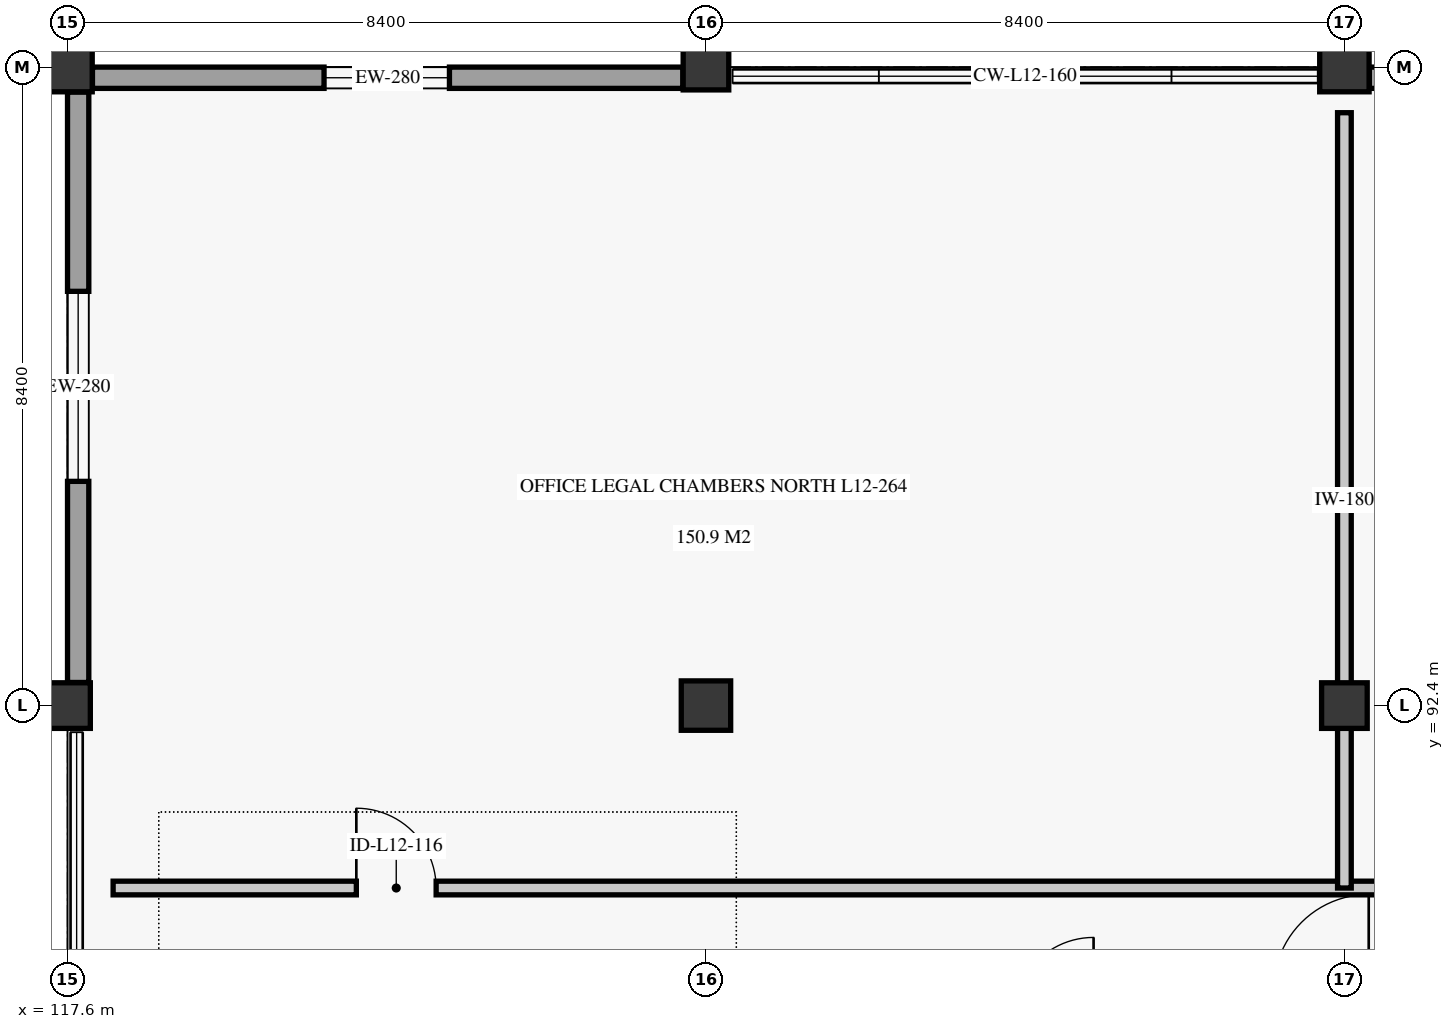
"""IFC4 building model, lengths in metres.
Left out: names, types, materials, properties, quantities, classifications, styles, units other than length and angle.
Written with IfcOpenShell. Run it as: python <this file> out.ifc"""

import sys

from ifc_helpers import new_model, si_unit, direction, frame, frame_2d, origin, origin_2d, place, context, subcontext, project, spatial, rectangle, extrude, element, fill, save


model = new_model("IFC4")
c1 = context("Model", 3, precision=1e-05, world=origin(), true_north=direction((0.0, 1.0)))
c2 = subcontext(c1, "Body", "Model", "MODEL_VIEW")
j1 = project(units=[si_unit("LENGTHUNIT", "METRE"), si_unit("PLANEANGLEUNIT", "RADIAN")], contexts=[c1])
p1 = place(None, origin())
s1 = spatial("IfcSite", under=j1, at=p1, CompositionType="ELEMENT")
p2 = place(p1, origin())
s2 = spatial("IfcBuilding", under=s1, at=p2, CompositionType="ELEMENT")
p3 = place(p2, frame((0.0, 0.0, 50.7)))
s3 = spatial("IfcBuildingStorey", under=s2, at=p3, CompositionType="ELEMENT", Elevation=50.7)
p4 = place(p3, frame((117.6, 92.4, 0.0), z_axis=(0.0, 0.0, 1.0), x_axis=(1.0, 0.0, 0.0)))
e1 = element("IfcColumn", 1, at=p4, inside=s3, PredefinedType="COLUMN", context=c2, shape_type="SweptSolid", body=[
    extrude(rectangle(XDim=0.6, YDim=0.6, at=origin_2d()), origin(), (0.0, 0.0, 1.0), 3.72),
])
for number, where, z_axis, x_axis in (
    (2, (117.6, 100.8, 0.0), (0.0, 0.0, 1.0), (1.0, 0.0, 0.0)),
    (3, (126.0, 92.4, 0.0), (0.0, 0.0, 1.0), (1.0, 0.0, 0.0)),
):
    element("IfcColumn", number, at=place(p3, frame(where, z_axis=z_axis, x_axis=x_axis)), inside=s3, PredefinedType="COLUMN", context=c2, shape_type="SweptSolid", body=[
        extrude(rectangle(XDim=0.65, YDim=0.65, at=origin_2d()), origin(), (0.0, 0.0, 1.0), 3.72),
    ])
for number, where, z_axis, x_axis in (
    (4, (126.0, 100.8, 0.0), (0.0, 0.0, 1.0), (1.0, 0.0, 0.0)),
    (5, (134.4, 92.4, 0.0), (0.0, 0.0, 1.0), (1.0, 0.0, 0.0)),
):
    element("IfcColumn", number, at=place(p3, frame(where, z_axis=z_axis, x_axis=x_axis)), inside=s3, PredefinedType="COLUMN", context=c2, shape_type="SweptSolid", body=[
        extrude(rectangle(XDim=0.6, YDim=0.6, at=origin_2d()), origin(), (0.0, 0.0, 1.0), 3.72),
    ])
p5 = place(p3, frame((134.4, 100.8, 0.0), z_axis=(0.0, 0.0, 1.0), x_axis=(1.0, 0.0, 0.0)))
e6 = element("IfcColumn", 6, at=p5, inside=s3, PredefinedType="COLUMN", context=c2, shape_type="SweptSolid", body=[
    extrude(rectangle(XDim=0.65, YDim=0.65, at=origin_2d()), origin(), (0.0, 0.0, 1.0), 3.72),
])
p6 = place(p3, frame((117.928, 100.66, 0.0), z_axis=(0.0, 0.0, 1.0), x_axis=(1.0, 0.0, 0.0)))
e7 = element("IfcWall", 7, at=p6, inside=s3, PredefinedType="SOLIDWALL", context=c2, shape_type="SweptSolid", body=[
    extrude(rectangle(XDim=7.768, YDim=0.28, at=frame_2d((3.884, 0.0))), origin(), (0.0, 0.0, 1.0), 3.04),
])
p7 = place(p6, frame((3.047, 0.0, 0.85)))
e8 = element("IfcOpeningElement", 8, at=p7, cuts=e7, PredefinedType="OPENING", context=c2, shape_type="SweptSolid", body=[
    extrude(rectangle(XDim=1.65, YDim=1.75, at=frame_2d((0.825, 0.875))), frame((0.0, 0.15, 0.0), z_axis=(0.0, -1.0, 0.0), x_axis=(1.0, 0.0, 0.0)), (0.0, 0.0, 1.0), 0.3),
])
p8 = place(p3, frame((134.728, 100.66, 0.0), z_axis=(0.0, 0.0, 1.0), x_axis=(1.0, 0.0, 0.0)))
e9 = element("IfcWall", 9, at=p8, inside=s3, PredefinedType="SOLIDWALL", context=c2, shape_type="SweptSolid", body=[
    extrude(rectangle(XDim=7.77, YDim=0.28, at=frame_2d((3.885, 0.0))), origin(), (0.0, 0.0, 1.0), 3.04),
])
p9 = place(p8, frame((3.272, 0.0, 0.85)))
e10 = element("IfcOpeningElement", 10, at=p9, cuts=e9, PredefinedType="OPENING", context=c2, shape_type="SweptSolid", body=[
    extrude(rectangle(XDim=1.2, YDim=1.6, at=frame_2d((0.6, 0.8))), frame((0.0, 0.15, 0.0), z_axis=(0.0, -1.0, 0.0), x_axis=(1.0, 0.0, 0.0)), (0.0, 0.0, 1.0), 0.3),
])
p10 = place(p3, frame((117.74, 92.704, 0.0), z_axis=(0.0, 0.0, 1.0), x_axis=(0.0, 1.0, 0.0)))
e11 = element("IfcWall", 11, at=p10, inside=s3, PredefinedType="SOLIDWALL", context=c2, shape_type="SweptSolid", body=[
    extrude(rectangle(XDim=7.768, YDim=0.28, at=frame_2d((3.884, 0.0))), origin(), (0.0, 0.0, 1.0), 3.04),
])
p11 = place(p10, frame((2.646, 0.0, 0.85)))
e12 = element("IfcOpeningElement", 12, at=p11, cuts=e11, PredefinedType="OPENING", context=c2, shape_type="SweptSolid", body=[
    extrude(rectangle(XDim=2.5, YDim=1.8, at=frame_2d((1.25, 0.9))), frame((0.0, 0.15, 0.0), z_axis=(0.0, -1.0, 0.0), x_axis=(1.0, 0.0, 0.0)), (0.0, 0.0, 1.0), 0.3),
])
p12 = place(p3, frame((118.2, 90.0, 0.0), z_axis=(0.0, 0.0, 1.0), x_axis=(1.0, 0.0, 0.0)))
e13 = element("IfcWall", 13, at=p12, inside=s3, PredefinedType="PARTITIONING", context=c2, shape_type="SweptSolid", body=[
    extrude(rectangle(XDim=40.8, YDim=0.18, at=frame_2d((20.4, 0.0))), origin(), (0.0, 0.0, 1.0), 3.34),
])
p13 = place(p12, frame((3.2, 0.0, 0.0)))
e14 = element("IfcOpeningElement", 14, at=p13, cuts=e13, PredefinedType="OPENING", context=c2, shape_type="SweptSolid", body=[
    extrude(rectangle(XDim=1.05, YDim=2.2, at=frame_2d((0.525, 1.1))), frame((0.0, 0.1, 0.0), z_axis=(0.0, -1.0, 0.0), x_axis=(1.0, 0.0, 0.0)), (0.0, 0.0, 1.0), 0.2),
])
p14 = place(p12, frame((20.6, 0.0, 0.0)))
e15 = element("IfcOpeningElement", 15, at=p14, cuts=e13, PredefinedType="OPENING", context=c2, shape_type="SweptSolid", body=[
    extrude(rectangle(XDim=1.05, YDim=2.2, at=frame_2d((0.525, 1.1))), frame((0.0, 0.1, 0.0), z_axis=(0.0, -1.0, 0.0), x_axis=(1.0, 0.0, 0.0)), (0.0, 0.0, 1.0), 0.2),
])
p15 = place(p3, frame((134.4, 90.0, 0.0), z_axis=(0.0, 0.0, 1.0), x_axis=(0.0, 1.0, 0.0)))
e16 = element("IfcWall", 16, at=p15, inside=s3, PredefinedType="PARTITIONING", context=c2, shape_type="SweptSolid", body=[
    extrude(rectangle(XDim=10.2, YDim=0.18, at=frame_2d((5.1, 0.0))), origin(), (0.0, 0.0, 1.0), 3.34),
])
p16 = place(p7, origin())
e17 = element("IfcWindow", 17, at=p16, inside=s3, PartitioningType="SINGLE_PANEL", PredefinedType="WINDOW", context=c2, shape_type="SweptSolid", body=[
    extrude(rectangle(XDim=1.65, YDim=1.75, at=frame_2d((0.825, 0.875))), frame((0.0, 0.03, 0.0), z_axis=(0.0, -1.0, 0.0), x_axis=(1.0, 0.0, 0.0)), (0.0, 0.0, 1.0), 0.06),
])
fill(e8, e17)
p17 = place(p11, origin())
e18 = element("IfcWindow", 18, at=p17, inside=s3, PartitioningType="SINGLE_PANEL", PredefinedType="WINDOW", context=c2, shape_type="SweptSolid", body=[
    extrude(rectangle(XDim=2.5, YDim=1.8, at=frame_2d((1.25, 0.9))), frame((0.0, 0.03, 0.0), z_axis=(0.0, -1.0, 0.0), x_axis=(1.0, 0.0, 0.0)), (0.0, 0.0, 1.0), 0.06),
])
fill(e12, e18)
p18 = place(p13, origin())
e19 = element("IfcDoor", 19, at=p18, inside=s3, OperationType="SINGLE_SWING_LEFT", PredefinedType="DOOR", context=c2, shape_type="SweptSolid", body=[
    extrude(rectangle(XDim=1.05, YDim=2.2, at=frame_2d((0.525, 1.1))), frame((0.0, 0.025, 0.0), z_axis=(0.0, -1.0, 0.0), x_axis=(1.0, 0.0, 0.0)), (0.0, 0.0, 1.0), 0.05),
])
fill(e14, e19)
save(model, sys.argv[1])
